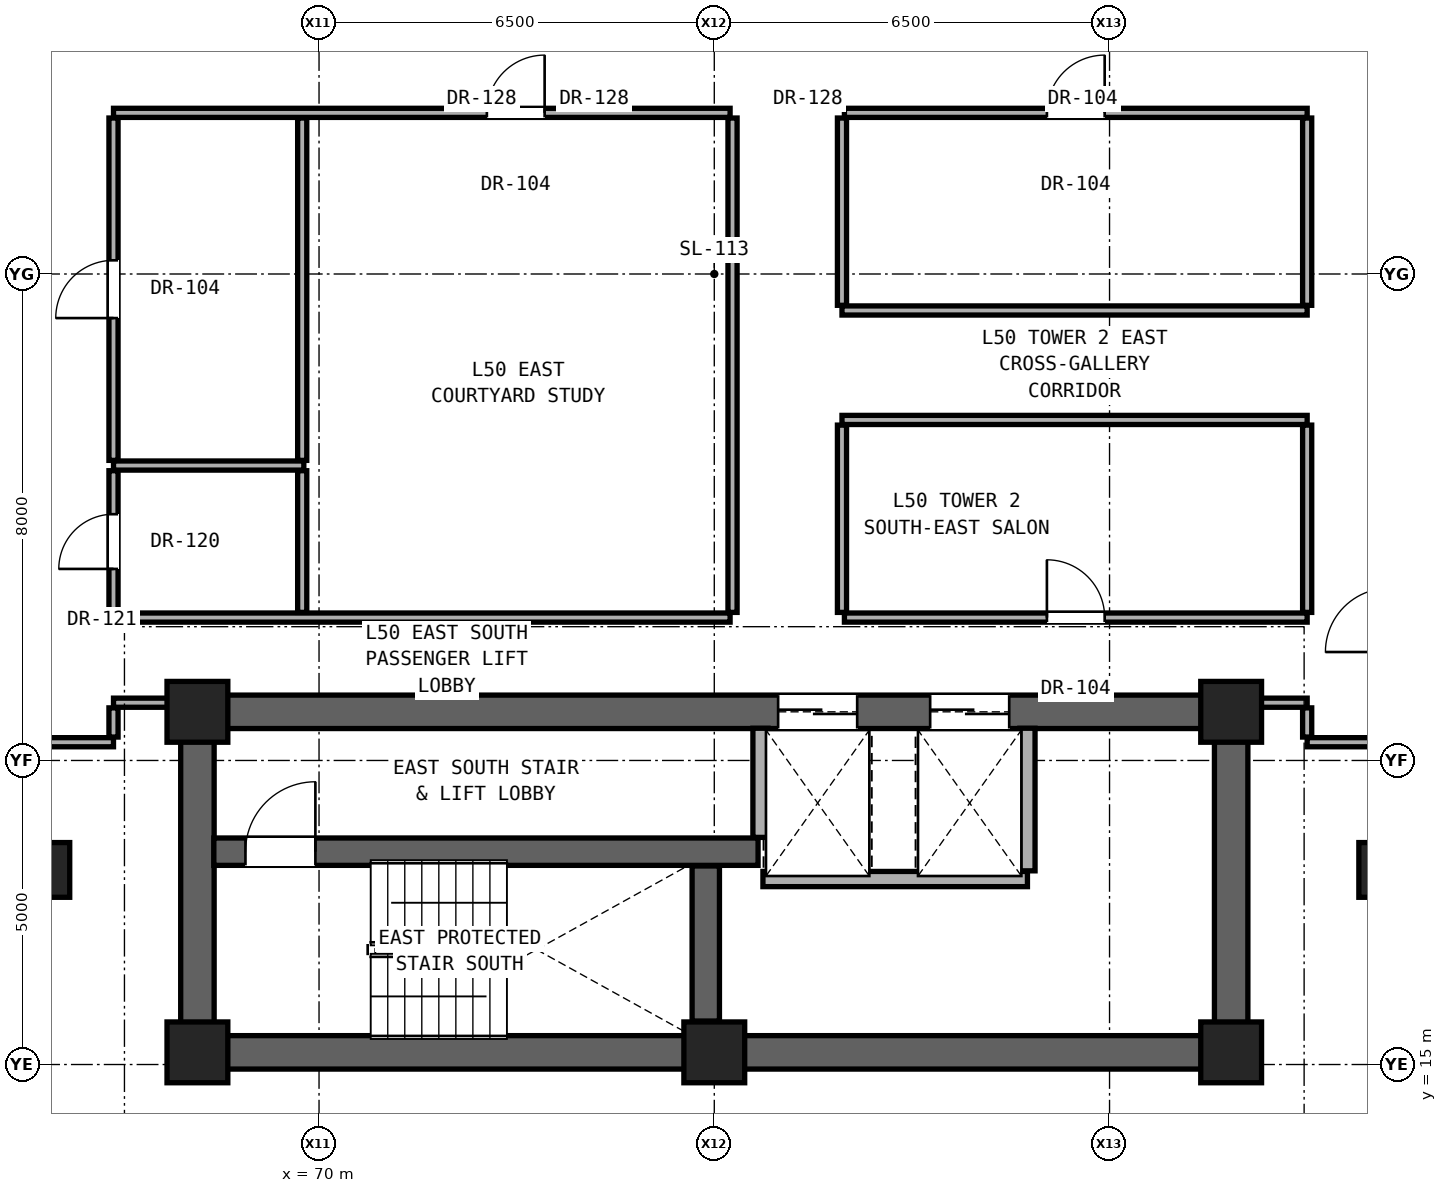
"""IFC4 building model, lengths in metres.
Left out: names, types, materials, properties, quantities, classifications, styles, units other than length and angle.
Written with IfcOpenShell. Run it as: python <this file> out.ifc"""

import sys

from ifc_helpers import new_model, si_unit, direction, frame, frame_2d, origin, origin_2d, place, context, subcontext, project, spatial, rectangle, extrude, element, fill, save


model = new_model("IFC4")
c1 = context("Model", 3, precision=1e-05, world=origin(), true_north=direction((0.0, 1.0)))
c2 = subcontext(c1, "Body", "Model", "MODEL_VIEW")
j1 = project(units=[si_unit("LENGTHUNIT", "METRE"), si_unit("PLANEANGLEUNIT", "RADIAN")], contexts=[c1])
p1 = place(None, origin())
s1 = spatial("IfcSite", under=j1, at=p1, CompositionType="ELEMENT")
p2 = place(p1, origin())
s2 = spatial("IfcBuilding", under=s1, at=p2, CompositionType="ELEMENT")
p3 = place(p2, frame((0.0, 0.0, 177.15)))
s3 = spatial("IfcBuildingStorey", under=s2, at=p3, CompositionType="ELEMENT", Elevation=177.15)
for number, where, z_axis, x_axis in (
    (1, (68.0, 15.2, 0.0), (0.0, 0.0, 1.0), (1.0, 0.0, 0.0)),
    (2, (76.5, 15.2, 0.0), (0.0, 0.0, 1.0), (1.0, 0.0, 0.0)),
    (3, (85.0, 15.2, 0.0), (0.0, 0.0, 1.0), (1.0, 0.0, 0.0)),
    (4, (68.0, 20.8, 0.0), (0.0, 0.0, 1.0), (1.0, 0.0, 0.0)),
    (5, (85.0, 20.8, 0.0), (0.0, 0.0, 1.0), (1.0, 0.0, 0.0)),
):
    element("IfcColumn", number, at=place(p3, frame(where, z_axis=z_axis, x_axis=x_axis)), inside=s3, PredefinedType="COLUMN", context=c2, shape_type="SweptSolid", body=[
        extrude(rectangle(XDim=1.0, YDim=1.0, at=origin_2d()), origin(), (0.0, 0.0, 1.0), 3.25),
    ])
for number, where, z_axis, x_axis in (
    (6, (65.6, 18.2, 0.0), (0.0, 0.0, 1.0), (1.0, 0.0, 0.0)),
    (7, (87.4, 18.2, 0.0), (0.0, 0.0, 1.0), (1.0, 0.0, 0.0)),
):
    element("IfcColumn", number, at=place(p3, frame(where, z_axis=z_axis, x_axis=x_axis)), inside=s3, PredefinedType="PILASTER", context=c2, shape_type="SweptSolid", body=[
        extrude(rectangle(XDim=0.6, YDim=0.9, at=origin_2d()), origin(), (0.0, 0.0, 1.0), 3.25),
    ])
p4 = place(p3, frame((68.0, 15.2, 0.0), z_axis=(0.0, 0.0, 1.0), x_axis=(1.0, 0.0, 0.0)))
e8 = element("IfcWall", 8, at=p4, inside=s3, PredefinedType="SHEAR", context=c2, shape_type="SweptSolid", body=[
    extrude(rectangle(XDim=17.0, YDim=0.55, at=frame_2d((8.5, 0.0))), origin(), (0.0, 0.0, 1.0), 3.05),
])
for number, where, z_axis, x_axis in (
    (9, (68.0, 15.2, 0.0), (0.0, 0.0, 1.0), (0.0, 1.0, 0.0)),
    (10, (85.0, 15.2, 0.0), (0.0, 0.0, 1.0), (0.0, 1.0, 0.0)),
):
    element("IfcWall", number, at=place(p3, frame(where, z_axis=z_axis, x_axis=x_axis)), inside=s3, PredefinedType="SHEAR", context=c2, shape_type="SweptSolid", body=[
        extrude(rectangle(XDim=5.6, YDim=0.55, at=frame_2d((2.8, 0.0))), origin(), (0.0, 0.0, 1.0), 3.05),
    ])
p5 = place(p3, frame((68.0, 20.8, 0.0), z_axis=(0.0, 0.0, 1.0), x_axis=(1.0, 0.0, 0.0)))
e11 = element("IfcWall", 11, at=p5, inside=s3, PredefinedType="SHEAR", context=c2, shape_type="SweptSolid", body=[
    extrude(rectangle(XDim=17.0, YDim=0.55, at=frame_2d((8.5, 0.0))), origin(), (0.0, 0.0, 1.0), 3.05),
])
p6 = place(p5, frame((9.55, 0.0, 0.0)))
e12 = element("IfcOpeningElement", 12, at=p6, cuts=e11, PredefinedType="OPENING", context=c2, shape_type="SweptSolid", body=[
    extrude(rectangle(XDim=1.3, YDim=2.3, at=frame_2d((0.65, 1.15))), frame((0.0, 0.285, 0.0), z_axis=(0.0, -1.0, 0.0), x_axis=(1.0, 0.0, 0.0)), (0.0, 0.0, 1.0), 0.57),
])
p7 = place(p5, frame((12.05, 0.0, 0.0)))
e13 = element("IfcOpeningElement", 13, at=p7, cuts=e11, PredefinedType="OPENING", context=c2, shape_type="SweptSolid", body=[
    extrude(rectangle(XDim=1.3, YDim=2.3, at=frame_2d((0.65, 1.15))), frame((0.0, 0.285, 0.0), z_axis=(0.0, -1.0, 0.0), x_axis=(1.0, 0.0, 0.0)), (0.0, 0.0, 1.0), 0.57),
])
p8 = place(p3, frame((77.3, 18.05, 0.0), z_axis=(0.0, 0.0, 1.0), x_axis=(1.0, 0.0, 0.0)))
e14 = element("IfcWall", 14, at=p8, inside=s3, PredefinedType="SOLIDWALL", context=c2, shape_type="SweptSolid", body=[
    extrude(rectangle(XDim=4.35, YDim=0.25, at=frame_2d((2.175, 0.0))), origin(), (0.0, 0.0, 1.0), 3.05),
])
p9 = place(p3, frame((68.27, 18.5, 0.0), z_axis=(0.0, 0.0, 1.0), x_axis=(1.0, 0.0, 0.0)))
e15 = element("IfcWall", 15, at=p9, inside=s3, PredefinedType="SHEAR", context=c2, shape_type="SweptSolid", body=[
    extrude(rectangle(XDim=8.95, YDim=0.45, at=frame_2d((4.475, 0.0))), origin(), (0.0, 0.0, 1.0), 3.05),
])
p10 = place(p9, frame((0.52, 0.0, 0.0)))
e16 = element("IfcOpeningElement", 16, at=p10, cuts=e15, PredefinedType="OPENING", context=c2, shape_type="SweptSolid", body=[
    extrude(rectangle(XDim=1.15, YDim=2.2, at=frame_2d((0.575, 1.1))), frame((0.0, 0.235, 0.0), z_axis=(0.0, -1.0, 0.0), x_axis=(1.0, 0.0, 0.0)), (0.0, 0.0, 1.0), 0.47),
])
p11 = place(p3, frame((65.25, 20.3, 0.0), z_axis=(0.0, 0.0, 1.0), x_axis=(1.0, 0.0, 0.0)))
e17 = element("IfcWall", 17, at=p11, inside=s3, PredefinedType="PARTITIONING", context=c2, shape_type="SweptSolid", body=[
    extrude(rectangle(XDim=1.37, YDim=0.15, at=frame_2d((0.685, 0.0))), origin(), (0.0, 0.0, 1.0), 3.05),
])
p12 = place(p3, frame((86.25, 20.3, 0.0), z_axis=(0.0, 0.0, 1.0), x_axis=(1.0, 0.0, 0.0)))
e18 = element("IfcWall", 18, at=p12, inside=s3, PredefinedType="PARTITIONING", context=c2, shape_type="SweptSolid", body=[
    extrude(rectangle(XDim=1.35, YDim=0.15, at=frame_2d((0.675, 0.0))), origin(), (0.0, 0.0, 1.0), 3.05),
])
p13 = place(p3, frame((66.62, 20.95, 0.0), z_axis=(0.0, 0.0, 1.0), x_axis=(1.0, 0.0, 0.0)))
e19 = element("IfcWall", 19, at=p13, inside=s3, PredefinedType="PARTITIONING", context=c2, shape_type="SweptSolid", body=[
    extrude(rectangle(XDim=1.11, YDim=0.15, at=frame_2d((0.555, 0.0))), origin(), (0.0, 0.0, 1.0), 2.442),
])
p14 = place(p3, frame((85.27, 20.95, 0.0), z_axis=(0.0, 0.0, 1.0), x_axis=(1.0, 0.0, 0.0)))
e20 = element("IfcWall", 20, at=p14, inside=s3, PredefinedType="PARTITIONING", context=c2, shape_type="SweptSolid", body=[
    extrude(rectangle(XDim=0.98, YDim=0.15, at=frame_2d((0.49, 0.0))), origin(), (0.0, 0.0, 1.0), 2.442),
])
p15 = place(p3, frame((66.62, 22.35, 0.0), z_axis=(0.0, 0.0, 1.0), x_axis=(1.0, 0.0, 0.0)))
e21 = element("IfcWall", 21, at=p15, inside=s3, PredefinedType="PARTITIONING", context=c2, shape_type="SweptSolid", body=[
    extrude(rectangle(XDim=10.14, YDim=0.15, at=frame_2d((5.07, 0.0))), origin(), (0.0, 0.0, 1.0), 2.186),
])
p16 = place(p3, frame((78.64, 22.35, 0.0), z_axis=(0.0, 0.0, 1.0), x_axis=(1.0, 0.0, 0.0)))
e22 = element("IfcWall", 22, at=p16, inside=s3, PredefinedType="PARTITIONING", context=c2, shape_type="SweptSolid", body=[
    extrude(rectangle(XDim=7.61, YDim=0.15, at=frame_2d((3.805, 0.0))), origin(), (0.0, 0.0, 1.0), 2.186),
])
p17 = place(p16, frame((3.33, 0.0, 0.0)))
e23 = element("IfcOpeningElement", 23, at=p17, cuts=e22, PredefinedType="OPENING", context=c2, shape_type="SweptSolid", body=[
    extrude(rectangle(XDim=0.95, YDim=2.15, at=frame_2d((0.475, 1.075))), frame((0.0, 0.085, 0.0), z_axis=(0.0, -1.0, 0.0), x_axis=(1.0, 0.0, 0.0)), (0.0, 0.0, 1.0), 0.17),
])
p18 = place(p3, frame((66.62, 24.85, 0.0), z_axis=(0.0, 0.0, 1.0), x_axis=(1.0, 0.0, 0.0)))
e24 = element("IfcWall", 24, at=p18, inside=s3, PredefinedType="PARTITIONING", context=c2, shape_type="SweptSolid", body=[
    extrude(rectangle(XDim=3.13, YDim=0.15, at=frame_2d((1.565, 0.0))), origin(), (0.0, 0.0, 1.0), 2.186),
])
for number, where, z_axis, x_axis in (
    (25, (78.6, 25.6, 0.0), (0.0, 0.0, 1.0), (1.0, 0.0, 0.0)),
    (26, (78.6, 27.4, 0.0), (0.0, 0.0, 1.0), (1.0, 0.0, 0.0)),
):
    element("IfcWall", number, at=place(p3, frame(where, z_axis=z_axis, x_axis=x_axis)), inside=s3, PredefinedType="PARTITIONING", context=c2, shape_type="SweptSolid", body=[
        extrude(rectangle(XDim=7.65, YDim=0.15, at=frame_2d((3.825, 0.0))), origin(), (0.0, 0.0, 1.0), 2.186),
    ])
p19 = place(p3, frame((66.62, 30.65, 0.0), z_axis=(0.0, 0.0, 1.0), x_axis=(1.0, 0.0, 0.0)))
e27 = element("IfcWall", 27, at=p19, inside=s3, PredefinedType="PARTITIONING", context=c2, shape_type="SweptSolid", body=[
    extrude(rectangle(XDim=10.14, YDim=0.15, at=frame_2d((5.07, 0.0))), origin(), (0.0, 0.0, 1.0), 2.186),
])
p20 = place(p19, frame((6.14, 0.0, 0.0)))
e28 = element("IfcOpeningElement", 28, at=p20, cuts=e27, PredefinedType="OPENING", context=c2, shape_type="SweptSolid", body=[
    extrude(rectangle(XDim=0.95, YDim=2.15, at=frame_2d((0.475, 1.075))), frame((0.0, 0.085, 0.0), z_axis=(0.0, -1.0, 0.0), x_axis=(1.0, 0.0, 0.0)), (0.0, 0.0, 1.0), 0.17),
])
p21 = place(p3, frame((78.64, 30.65, 0.0), z_axis=(0.0, 0.0, 1.0), x_axis=(1.0, 0.0, 0.0)))
e29 = element("IfcWall", 29, at=p21, inside=s3, PredefinedType="PARTITIONING", context=c2, shape_type="SweptSolid", body=[
    extrude(rectangle(XDim=7.61, YDim=0.15, at=frame_2d((3.805, 0.0))), origin(), (0.0, 0.0, 1.0), 2.186),
])
p22 = place(p21, frame((3.33, 0.0, 0.0)))
e30 = element("IfcOpeningElement", 30, at=p22, cuts=e29, PredefinedType="OPENING", context=c2, shape_type="SweptSolid", body=[
    extrude(rectangle(XDim=0.95, YDim=2.15, at=frame_2d((0.475, 1.075))), frame((0.0, 0.085, 0.0), z_axis=(0.0, -1.0, 0.0), x_axis=(1.0, 0.0, 0.0)), (0.0, 0.0, 1.0), 0.17),
])
p23 = place(p3, frame((66.62, 20.385, 0.0), z_axis=(0.0, 0.0, 1.0), x_axis=(0.0, 1.0, 0.0)))
e31 = element("IfcWall", 31, at=p23, inside=s3, PredefinedType="PARTITIONING", context=c2, shape_type="SweptSolid", body=[
    extrude(rectangle(XDim=0.48, YDim=0.15, at=frame_2d((0.24, 0.0))), origin(), (0.0, 0.0, 1.0), 2.442),
])
p24 = place(p3, frame((66.62, 22.435, 0.0), z_axis=(0.0, 0.0, 1.0), x_axis=(0.0, 1.0, 0.0)))
e32 = element("IfcWall", 32, at=p24, inside=s3, PredefinedType="PARTITIONING", context=c2, shape_type="SweptSolid", body=[
    extrude(rectangle(XDim=2.33, YDim=0.15, at=frame_2d((1.165, 0.0))), origin(), (0.0, 0.0, 1.0), 3.05),
])
p25 = place(p24, frame((0.715, 0.0, 0.0)))
e33 = element("IfcOpeningElement", 33, at=p25, cuts=e32, PredefinedType="OPENING", context=c2, shape_type="SweptSolid", body=[
    extrude(rectangle(XDim=0.9, YDim=2.1, at=frame_2d((0.45, 1.05))), frame((0.0, 0.085, 0.0), z_axis=(0.0, -1.0, 0.0), x_axis=(1.0, 0.0, 0.0)), (0.0, 0.0, 1.0), 0.17),
])
p26 = place(p3, frame((66.62, 24.935, 0.0), z_axis=(0.0, 0.0, 1.0), x_axis=(0.0, 1.0, 0.0)))
e34 = element("IfcWall", 34, at=p26, inside=s3, PredefinedType="PARTITIONING", context=c2, shape_type="SweptSolid", body=[
    extrude(rectangle(XDim=5.63, YDim=0.15, at=frame_2d((2.815, 0.0))), origin(), (0.0, 0.0, 1.0), 2.346),
])
p27 = place(p26, frame((2.34, 0.0, 0.0)))
e35 = element("IfcOpeningElement", 35, at=p27, cuts=e34, PredefinedType="OPENING", context=c2, shape_type="SweptSolid", body=[
    extrude(rectangle(XDim=0.95, YDim=2.15, at=frame_2d((0.475, 1.075))), frame((0.0, 0.085, 0.0), z_axis=(0.0, -1.0, 0.0), x_axis=(1.0, 0.0, 0.0)), (0.0, 0.0, 1.0), 0.17),
])
p28 = place(p3, frame((69.723, 22.435, 0.0), z_axis=(0.0, 0.0, 1.0), x_axis=(0.0, 1.0, 0.0)))
e36 = element("IfcWall", 36, at=p28, inside=s3, PredefinedType="PARTITIONING", context=c2, shape_type="SweptSolid", body=[
    extrude(rectangle(XDim=2.33, YDim=0.15, at=frame_2d((1.165, 0.0))), origin(), (0.0, 0.0, 1.0), 3.05),
])
p29 = place(p3, frame((69.723, 24.935, 0.0), z_axis=(0.0, 0.0, 1.0), x_axis=(0.0, 1.0, 0.0)))
e37 = element("IfcWall", 37, at=p29, inside=s3, PredefinedType="PARTITIONING", context=c2, shape_type="SweptSolid", body=[
    extrude(rectangle(XDim=5.63, YDim=0.15, at=frame_2d((2.815, 0.0))), origin(), (0.0, 0.0, 1.0), 2.186),
])
p30 = place(p3, frame((76.36, 15.715, 0.0), z_axis=(0.0, 0.0, 1.0), x_axis=(0.0, 1.0, 0.0)))
e38 = element("IfcWall", 38, at=p30, inside=s3, PredefinedType="SHEAR", context=c2, shape_type="SweptSolid", body=[
    extrude(rectangle(XDim=2.55, YDim=0.45, at=frame_2d((1.275, 0.0))), origin(), (0.0, 0.0, 1.0), 3.05),
])
p31 = place(p3, frame((76.8, 22.435, 0.0), z_axis=(0.0, 0.0, 1.0), x_axis=(0.0, 1.0, 0.0)))
e39 = element("IfcWall", 39, at=p31, inside=s3, PredefinedType="PARTITIONING", context=c2, shape_type="SweptSolid", body=[
    extrude(rectangle(XDim=8.13, YDim=0.15, at=frame_2d((4.065, 0.0))), origin(), (0.0, 0.0, 1.0), 2.186),
])
p32 = place(p3, frame((77.26, 18.735, 0.0), z_axis=(0.0, 0.0, 1.0), x_axis=(0.0, 1.0, 0.0)))
e40 = element("IfcWall", 40, at=p32, inside=s3, PredefinedType="SOLIDWALL", context=c2, shape_type="SweptSolid", body=[
    extrude(rectangle(XDim=1.795, YDim=0.25, at=frame_2d((0.897, 0.0))), origin(), (0.0, 0.0, 1.0), 3.05),
])
p33 = place(p3, frame((78.6, 22.435, 0.0), z_axis=(0.0, 0.0, 1.0), x_axis=(0.0, 1.0, 0.0)))
e41 = element("IfcWall", 41, at=p33, inside=s3, PredefinedType="PARTITIONING", context=c2, shape_type="SweptSolid", body=[
    extrude(rectangle(XDim=3.08, YDim=0.15, at=frame_2d((1.54, 0.0))), origin(), (0.0, 0.0, 1.0), 3.05),
])
p34 = place(p3, frame((78.6, 27.485, 0.0), z_axis=(0.0, 0.0, 1.0), x_axis=(0.0, 1.0, 0.0)))
e42 = element("IfcWall", 42, at=p34, inside=s3, PredefinedType="PARTITIONING", context=c2, shape_type="SweptSolid", body=[
    extrude(rectangle(XDim=3.08, YDim=0.15, at=frame_2d((1.54, 0.0))), origin(), (0.0, 0.0, 1.0), 2.186),
])
p35 = place(p3, frame((81.65, 18.185, 0.0), z_axis=(0.0, 0.0, 1.0), x_axis=(0.0, 1.0, 0.0)))
e43 = element("IfcWall", 43, at=p35, inside=s3, PredefinedType="SOLIDWALL", context=c2, shape_type="SweptSolid", body=[
    extrude(rectangle(XDim=2.345, YDim=0.25, at=frame_2d((1.172, 0.0))), origin(), (0.0, 0.0, 1.0), 3.05),
])
p36 = place(p3, frame((86.25, 20.385, 0.0), z_axis=(0.0, 0.0, 1.0), x_axis=(0.0, 1.0, 0.0)))
e44 = element("IfcWall", 44, at=p36, inside=s3, PredefinedType="PARTITIONING", context=c2, shape_type="SweptSolid", body=[
    extrude(rectangle(XDim=0.48, YDim=0.15, at=frame_2d((0.24, 0.0))), origin(), (0.0, 0.0, 1.0), 2.442),
])
p37 = place(p3, frame((86.25, 22.435, 0.0), z_axis=(0.0, 0.0, 1.0), x_axis=(0.0, 1.0, 0.0)))
e45 = element("IfcWall", 45, at=p37, inside=s3, PredefinedType="PARTITIONING", context=c2, shape_type="SweptSolid", body=[
    extrude(rectangle(XDim=3.08, YDim=0.15, at=frame_2d((1.54, 0.0))), origin(), (0.0, 0.0, 1.0), 3.05),
])
p38 = place(p3, frame((86.25, 27.485, 0.0), z_axis=(0.0, 0.0, 1.0), x_axis=(0.0, 1.0, 0.0)))
e46 = element("IfcWall", 46, at=p38, inside=s3, PredefinedType="PARTITIONING", context=c2, shape_type="SweptSolid", body=[
    extrude(rectangle(XDim=3.08, YDim=0.15, at=frame_2d((1.54, 0.0))), origin(), (0.0, 0.0, 1.0), 2.346),
])
p39 = place(p10, origin())
e47 = element("IfcDoor", 47, at=p39, inside=s3, OperationType="SINGLE_SWING_RIGHT", PredefinedType="DOOR", context=c2, shape_type="SweptSolid", body=[
    extrude(rectangle(XDim=1.15, YDim=2.2, at=frame_2d((0.575, 1.1))), frame((0.0, 0.025, 0.0), z_axis=(0.0, -1.0, 0.0), x_axis=(1.0, 0.0, 0.0)), (0.0, 0.0, 1.0), 0.05),
])
fill(e16, e47)
p40 = place(p25, origin())
e48 = element("IfcDoor", 48, at=p40, inside=s3, OperationType="SINGLE_SWING_LEFT", PredefinedType="DOOR", context=c2, shape_type="SweptSolid", body=[
    extrude(rectangle(XDim=0.9, YDim=2.1, at=frame_2d((0.45, 1.05))), frame((0.0, 0.025, 0.0), z_axis=(0.0, -1.0, 0.0), x_axis=(1.0, 0.0, 0.0)), (0.0, 0.0, 1.0), 0.05),
])
fill(e33, e48)
p41 = place(p27, origin())
e49 = element("IfcDoor", 49, at=p41, inside=s3, OperationType="SINGLE_SWING_LEFT", PredefinedType="DOOR", context=c2, shape_type="SweptSolid", body=[
    extrude(rectangle(XDim=0.95, YDim=2.15, at=frame_2d((0.475, 1.075))), frame((0.0, 0.025, 0.0), z_axis=(0.0, -1.0, 0.0), x_axis=(1.0, 0.0, 0.0)), (0.0, 0.0, 1.0), 0.05),
])
fill(e35, e49)
p42 = place(p20, origin())
e50 = element("IfcDoor", 50, at=p42, inside=s3, OperationType="SINGLE_SWING_RIGHT", PredefinedType="DOOR", context=c2, shape_type="SweptSolid", body=[
    extrude(rectangle(XDim=0.95, YDim=2.15, at=frame_2d((0.475, 1.075))), frame((0.0, 0.025, 0.0), z_axis=(0.0, -1.0, 0.0), x_axis=(1.0, 0.0, 0.0)), (0.0, 0.0, 1.0), 0.05),
])
fill(e28, e50)
p43 = place(p17, origin())
e51 = element("IfcDoor", 51, at=p43, inside=s3, OperationType="SINGLE_SWING_LEFT", PredefinedType="DOOR", context=c2, shape_type="SweptSolid", body=[
    extrude(rectangle(XDim=0.95, YDim=2.15, at=frame_2d((0.475, 1.075))), frame((0.0, 0.025, 0.0), z_axis=(0.0, -1.0, 0.0), x_axis=(1.0, 0.0, 0.0)), (0.0, 0.0, 1.0), 0.05),
])
fill(e23, e51)
p44 = place(p22, origin())
e52 = element("IfcDoor", 52, at=p44, inside=s3, OperationType="SINGLE_SWING_RIGHT", PredefinedType="DOOR", context=c2, shape_type="SweptSolid", body=[
    extrude(rectangle(XDim=0.95, YDim=2.15, at=frame_2d((0.475, 1.075))), frame((0.0, 0.025, 0.0), z_axis=(0.0, -1.0, 0.0), x_axis=(1.0, 0.0, 0.0)), (0.0, 0.0, 1.0), 0.05),
])
fill(e30, e52)
p45 = place(p6, origin())
e53 = element("IfcDoor", 53, at=p45, inside=s3, OperationType="DOUBLE_DOOR_SLIDING", PredefinedType="DOOR", context=c2, shape_type="SweptSolid", body=[
    extrude(rectangle(XDim=1.3, YDim=2.3, at=frame_2d((0.65, 1.15))), frame((0.0, 0.025, 0.0), z_axis=(0.0, -1.0, 0.0), x_axis=(1.0, 0.0, 0.0)), (0.0, 0.0, 1.0), 0.05),
])
fill(e12, e53)
p46 = place(p7, origin())
e54 = element("IfcDoor", 54, at=p46, inside=s3, OperationType="DOUBLE_DOOR_SLIDING", PredefinedType="DOOR", context=c2, shape_type="SweptSolid", body=[
    extrude(rectangle(XDim=1.3, YDim=2.3, at=frame_2d((0.65, 1.15))), frame((0.0, 0.025, 0.0), z_axis=(0.0, -1.0, 0.0), x_axis=(1.0, 0.0, 0.0)), (0.0, 0.0, 1.0), 0.05),
])
fill(e13, e54)
save(model, sys.argv[1])
